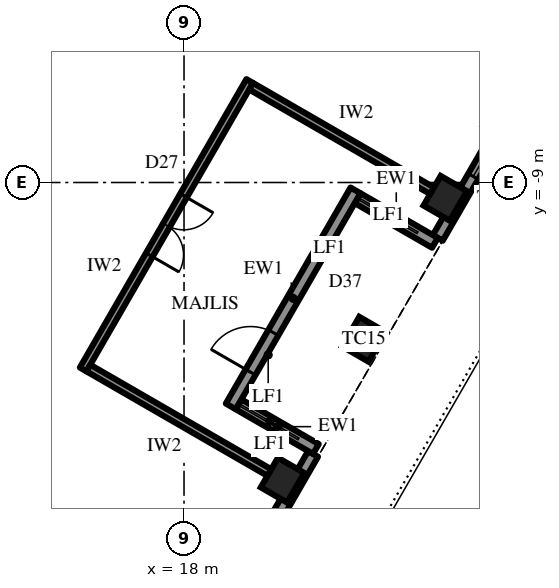
"""IFC4 building model, lengths in metres.
Left out: names, types, materials, properties, quantities, classifications, styles, units other than length and angle.
Written with IfcOpenShell. Run it as: python <this file> out.ifc"""

import sys

from ifc_helpers import new_model, si_unit, direction, frame, frame_2d, origin, origin_2d, place, context, subcontext, project, spatial, rectangle, extrude, element, fill, save


model = new_model("IFC4")
c1 = context("Model", 3, precision=1e-05, world=origin(), true_north=direction((0.0, 1.0)))
c2 = subcontext(c1, "Body", "Model", "MODEL_VIEW")
j1 = project(units=[si_unit("LENGTHUNIT", "METRE"), si_unit("PLANEANGLEUNIT", "RADIAN")], contexts=[c1])
p1 = place(None, origin())
s1 = spatial("IfcSite", under=j1, at=p1, CompositionType="ELEMENT")
p2 = place(p1, origin())
s2 = spatial("IfcBuilding", under=s1, at=p2, CompositionType="ELEMENT")
p3 = place(p2, frame((0.0, 0.0, 366.1)))
s3 = spatial("IfcBuildingStorey", under=s2, at=p3, CompositionType="ELEMENT", Elevation=366.1)
for number, where, z_axis, x_axis in (
    (1, (20.592, -16.833, 0.0), (0.0, 0.0, 1.0), (0.5, 0.866, 0.0)),
    (2, (22.733, -13.125, 0.0), (0.0, 0.0, 1.0), (0.5, 0.866, 0.0)),
    (3, (24.874, -9.417, 0.0), (0.0, 0.0, 1.0), (0.5, 0.866, 0.0)),
):
    element("IfcColumn", number, at=place(p3, frame(where, z_axis=z_axis, x_axis=x_axis)), inside=s3, PredefinedType="COLUMN", context=c2, shape_type="SweptSolid", body=[
        extrude(rectangle(XDim=0.9, YDim=0.8, at=origin_2d()), origin(), (0.0, 0.0, 1.0), 4.2),
    ])
p4 = place(p3, frame((16.613, -24.425, 0.0), z_axis=(0.0, 0.0, 1.0), x_axis=(0.499996453679, 0.866027451244, 0.0)))
e4 = element("IfcWall", 4, at=p4, inside=s3, PredefinedType="SOLIDWALL", context=c2, shape_type="SweptSolid", body=[
    extrude(rectangle(XDim=9.564, YDim=0.3, at=frame_2d((4.782, 0.0))), origin(), (0.0, 0.0, 1.0), 2.9),
])
p5 = place(p4, frame((0.866, 0.0, 0.6)))
e5 = element("IfcOpeningElement", 5, at=p5, cuts=e4, PredefinedType="OPENING", context=c2, shape_type="SweptSolid", body=[
    extrude(rectangle(XDim=2.55, YDim=2.05, at=frame_2d((1.275, 1.025))), frame((0.0, 0.16, 0.0), z_axis=(0.0, -1.0, 0.0), x_axis=(1.0, 0.0, 0.0)), (0.0, 0.0, 1.0), 0.32),
])
p6 = place(p4, frame((5.823, 0.0, 0.0)))
e6 = element("IfcOpeningElement", 6, at=p6, cuts=e4, PredefinedType="OPENING", context=c2, shape_type="SweptSolid", body=[
    extrude(rectangle(XDim=1.2, YDim=2.4, at=frame_2d((0.6, 1.2))), frame((0.0, 0.16, 0.0), z_axis=(0.0, -1.0, 0.0), x_axis=(1.0, 0.0, 0.0)), (0.0, 0.0, 1.0), 0.32),
])
p7 = place(p3, frame((24.677, -10.458, 0.0), z_axis=(0.0, 0.0, 1.0), x_axis=(0.499996453679, 0.866027451244, 0.0)))
e7 = element("IfcWall", 7, at=p7, inside=s3, PredefinedType="SOLIDWALL", context=c2, shape_type="SweptSolid", body=[
    extrude(rectangle(XDim=9.564, YDim=0.3, at=frame_2d((4.782, 0.0))), origin(), (0.0, 0.0, 1.0), 2.9),
])
p8 = place(p7, frame((1.866, 0.0, 0.6)))
e8 = element("IfcOpeningElement", 8, at=p8, cuts=e7, PredefinedType="OPENING", context=c2, shape_type="SweptSolid", body=[
    extrude(rectangle(XDim=2.55, YDim=2.05, at=frame_2d((1.275, 1.025))), frame((0.0, 0.16, 0.0), z_axis=(0.0, -1.0, 0.0), x_axis=(1.0, 0.0, 0.0)), (0.0, 0.0, 1.0), 0.32),
])
p9 = place(p7, frame((6.148, 0.0, 0.6)))
e9 = element("IfcOpeningElement", 9, at=p9, cuts=e7, PredefinedType="OPENING", context=c2, shape_type="SweptSolid", body=[
    extrude(rectangle(XDim=2.55, YDim=2.05, at=frame_2d((1.275, 1.025))), frame((0.0, 0.16, 0.0), z_axis=(0.0, -1.0, 0.0), x_axis=(1.0, 0.0, 0.0)), (0.0, 0.0, 1.0), 0.32),
])
for number, where, z_axis, x_axis in (
    (10, (21.47, -16.012, 0.0), (0.0, 0.0, 1.0), (-0.866, 0.5, 0.0)),
    (11, (24.602, -10.588, 0.0), (0.0, 0.0, 1.0), (-0.866, 0.5, 0.0)),
):
    element("IfcWall", number, at=place(p3, frame(where, z_axis=z_axis, x_axis=x_axis)), inside=s3, PredefinedType="SOLIDWALL", context=c2, shape_type="SweptSolid", body=[
        extrude(rectangle(XDim=2.35, YDim=0.3, at=frame_2d((1.175, 0.0))), origin(), (0.0, 0.0, 1.0), 2.9),
    ])
p10 = place(p3, frame((19.23, -14.892, 0.0), z_axis=(0.0, 0.0, 1.0), x_axis=(0.499999339774, 0.866025784966, 0.0)))
e12 = element("IfcWall", 12, at=p10, inside=s3, PredefinedType="SOLIDWALL", context=c2, shape_type="SweptSolid", body=[
    extrude(rectangle(XDim=6.564, YDim=0.3, at=frame_2d((3.282, 0.0))), origin(), (0.0, 0.0, 1.0), 2.9),
])
p11 = place(p10, frame((1.041, 0.0, 0.0)))
e13 = element("IfcOpeningElement", 13, at=p11, cuts=e12, PredefinedType="OPENING", context=c2, shape_type="SweptSolid", body=[
    extrude(rectangle(XDim=1.2, YDim=2.4, at=frame_2d((0.6, 1.2))), frame((0.0, 0.16, 0.0), z_axis=(0.0, -1.0, 0.0), x_axis=(1.0, 0.0, 0.0)), (0.0, 0.0, 1.0), 0.32),
])
p12 = place(p3, frame((15.346, -13.92, 0.0), z_axis=(0.0, 0.0, 1.0), x_axis=(0.500006995557, 0.86602136486, 0.0)))
e14 = element("IfcWall", 14, at=p12, inside=s3, PredefinedType="PARTITIONING", context=c2, shape_type="SweptSolid", body=[
    extrude(rectangle(XDim=8.764, YDim=0.2, at=frame_2d((4.382, 0.0))), origin(), (0.0, 0.0, 1.0), 4.0),
])
p13 = place(p12, frame((3.482, 0.0, 0.0)))
e15 = element("IfcOpeningElement", 15, at=p13, cuts=e14, PredefinedType="OPENING", context=c2, shape_type="SweptSolid", body=[
    extrude(rectangle(XDim=1.8, YDim=2.4, at=frame_2d((0.9, 1.2))), frame((0.0, 0.11, 0.0), z_axis=(0.0, -1.0, 0.0), x_axis=(1.0, 0.0, 0.0)), (0.0, 0.0, 1.0), 0.22),
])
p14 = place(p3, frame((15.483, -13.883, 0.0), z_axis=(0.0, 0.0, 1.0), x_axis=(0.866027397988, -0.499996545922, 0.0)))
e16 = element("IfcWall", 16, at=p14, inside=s3, PredefinedType="PARTITIONING", context=c2, shape_type="SweptSolid", body=[
    extrude(rectangle(XDim=5.5, YDim=0.2, at=frame_2d((2.75, 0.0))), origin(), (0.0, 0.0, 1.0), 3.082),
])
p15 = place(p3, frame((19.765, -6.467, 0.0), z_axis=(0.0, 0.0, 1.0), x_axis=(0.866027397988, -0.499996545922, 0.0)))
e17 = element("IfcWall", 17, at=p15, inside=s3, PredefinedType="PARTITIONING", context=c2, shape_type="SweptSolid", body=[
    extrude(rectangle(XDim=5.5, YDim=0.2, at=frame_2d((2.75, 0.0))), origin(), (0.0, 0.0, 1.0), 2.992),
])
p16 = place(p8, origin())
e18 = element("IfcWindow", 18, at=p16, inside=s3, PartitioningType="SINGLE_PANEL", PredefinedType="WINDOW", context=c2, shape_type="SweptSolid", body=[
    extrude(rectangle(XDim=2.55, YDim=2.05, at=frame_2d((1.275, 1.025))), frame((0.0, 0.03, 0.0), z_axis=(0.0, -1.0, 0.0), x_axis=(1.0, 0.0, 0.0)), (0.0, 0.0, 1.0), 0.06),
])
fill(e8, e18)
p17 = place(p11, origin())
e19 = element("IfcDoor", 19, at=p17, inside=s3, OperationType="SINGLE_SWING_RIGHT", PredefinedType="DOOR", context=c2, shape_type="SweptSolid", body=[
    extrude(rectangle(XDim=1.2, YDim=2.4, at=frame_2d((0.6, 1.2))), frame((0.0, 0.025, 0.0), z_axis=(0.0, -1.0, 0.0), x_axis=(1.0, 0.0, 0.0)), (0.0, 0.0, 1.0), 0.05),
])
fill(e13, e19)
p18 = place(p13, frame((1.8, 0.0, 0.0), z_axis=(0.0, 0.0, 1.0), x_axis=(-1.0, 0.0, 0.0)))
e20 = element("IfcDoor", 20, at=p18, inside=s3, OperationType="DOUBLE_DOOR_SINGLE_SWING", PredefinedType="DOOR", context=c2, shape_type="SweptSolid", body=[
    extrude(rectangle(XDim=1.8, YDim=2.4, at=frame_2d((0.9, 1.2))), frame((0.0, 0.025, 0.0), z_axis=(0.0, -1.0, 0.0), x_axis=(1.0, 0.0, 0.0)), (0.0, 0.0, 1.0), 0.05),
])
fill(e15, e20)
save(model, sys.argv[1])
